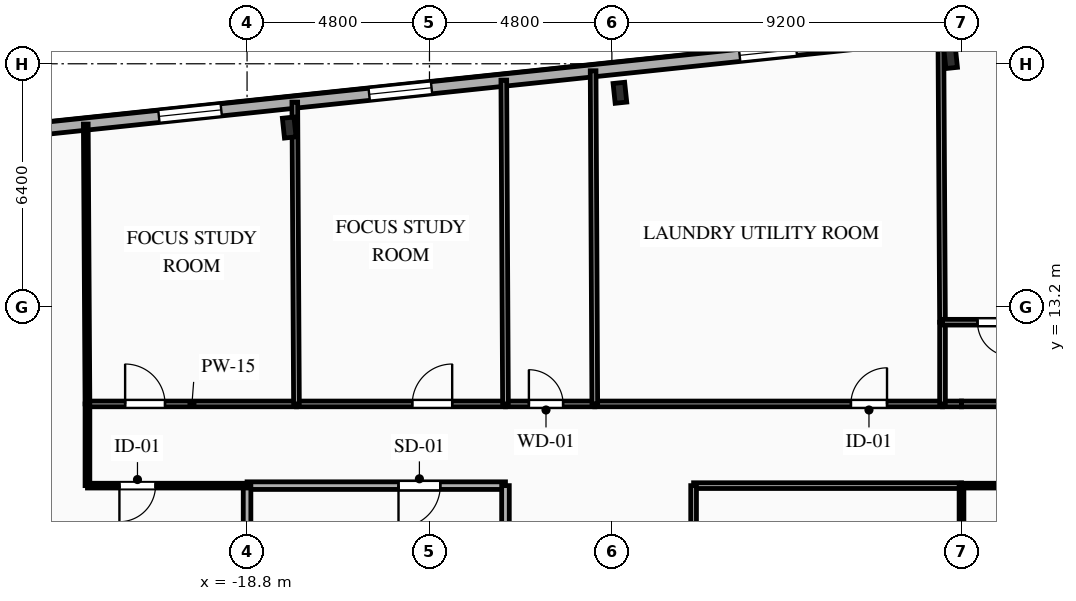
"""IFC4 building model, lengths in metres.
Left out: names, types, materials, properties, quantities, classifications, styles, units other than length and angle.
Written with IfcOpenShell. Run it as: python <this file> out.ifc"""

import sys

from ifc_helpers import new_model, si_unit, direction, frame, frame_2d, origin, origin_2d, place, context, subcontext, project, spatial, rectangle, i_section, extrude, element, fill, save


model = new_model("IFC4")
c1 = context("Model", 3, precision=1e-05, world=origin(), true_north=direction((0.0, 1.0)))
c2 = subcontext(c1, "Body", "Model", "MODEL_VIEW")
j1 = project(units=[si_unit("LENGTHUNIT", "METRE"), si_unit("PLANEANGLEUNIT", "RADIAN")], contexts=[c1])
p1 = place(None, origin())
s1 = spatial("IfcSite", under=j1, at=p1, CompositionType="ELEMENT")
p2 = place(p1, origin())
s2 = spatial("IfcBuilding", under=s1, at=p2, CompositionType="ELEMENT")
p3 = place(p2, frame((0.0, 0.0, 109.15)))
s3 = spatial("IfcBuildingStorey", under=s2, at=p3, CompositionType="ELEMENT", Elevation=109.15)
for number, where, z_axis, x_axis in (
    (1, (-0.287, 19.751, 0.0), (0.0, 0.0, 1.0), (0.995, 0.105, 0.0)),
    (2, (-8.989, 18.836, 0.0), (0.0, 0.0, 1.0), (0.995, 0.105, 0.0)),
    (3, (-17.691, 17.922, 0.0), (0.0, 0.0, 1.0), (0.995, 0.105, 0.0)),
):
    element("IfcColumn", number, at=place(p3, frame(where, z_axis=z_axis, x_axis=x_axis)), inside=s3, PredefinedType="COLUMN", context=c2, shape_type="SweptSolid", body=[
        extrude(i_section(OverallWidth=0.306, OverallDepth=0.524, WebThickness=0.021, FlangeThickness=0.04, FilletRadius=0.027, at=origin_2d()), origin(), (0.0, 0.0, 1.0), 3.35),
    ])
p4 = place(p3, frame((-27.107, 17.586, 0.0), z_axis=(0.0, 0.0, 1.0), x_axis=(0.994521628355, 0.104531003701, 0.0)))
e4 = element("IfcWall", 4, at=p4, inside=s3, PredefinedType="SOLIDWALL", context=c2, shape_type="SweptSolid", body=[
    extrude(rectangle(XDim=53.8, YDim=0.32, at=frame_2d((26.9, 0.0))), origin(), (0.0, 0.0, 1.0), 3.045),
])
p5 = place(p4, frame((1.532, 0.0, 0.85)))
e5 = element("IfcOpeningElement", 5, at=p5, cuts=e4, PredefinedType="OPENING", context=c2, shape_type="SweptSolid", body=[
    extrude(rectangle(XDim=1.5, YDim=1.85, at=frame_2d((0.75, 0.925))), frame((0.0, 0.17, 0.0), z_axis=(0.0, -1.0, 0.0), x_axis=(1.0, 0.0, 0.0)), (0.0, 0.0, 1.0), 0.34),
])
p6 = place(p4, frame((6.02, 0.0, 0.85)))
e6 = element("IfcOpeningElement", 6, at=p6, cuts=e4, PredefinedType="OPENING", context=c2, shape_type="SweptSolid", body=[
    extrude(rectangle(XDim=1.65, YDim=1.85, at=frame_2d((0.825, 0.925))), frame((0.0, 0.17, 0.0), z_axis=(0.0, -1.0, 0.0), x_axis=(1.0, 0.0, 0.0)), (0.0, 0.0, 1.0), 0.34),
])
p7 = place(p4, frame((11.584, 0.0, 0.85)))
e7 = element("IfcOpeningElement", 7, at=p7, cuts=e4, PredefinedType="OPENING", context=c2, shape_type="SweptSolid", body=[
    extrude(rectangle(XDim=1.65, YDim=1.85, at=frame_2d((0.825, 0.925))), frame((0.0, 0.17, 0.0), z_axis=(0.0, -1.0, 0.0), x_axis=(1.0, 0.0, 0.0)), (0.0, 0.0, 1.0), 0.34),
])
p8 = place(p4, frame((21.386, 0.0, 0.85)))
e8 = element("IfcOpeningElement", 8, at=p8, cuts=e4, PredefinedType="OPENING", context=c2, shape_type="SweptSolid", body=[
    extrude(rectangle(XDim=1.5, YDim=1.85, at=frame_2d((0.75, 0.925))), frame((0.0, 0.17, 0.0), z_axis=(0.0, -1.0, 0.0), x_axis=(1.0, 0.0, 0.0)), (0.0, 0.0, 1.0), 0.34),
])
p9 = place(p4, frame((31.404, 0.0, 0.85)))
e9 = element("IfcOpeningElement", 9, at=p9, cuts=e4, PredefinedType="OPENING", context=c2, shape_type="SweptSolid", body=[
    extrude(rectangle(XDim=2.2, YDim=1.85, at=frame_2d((1.1, 0.925))), frame((0.0, 0.17, 0.0), z_axis=(0.0, -1.0, 0.0), x_axis=(1.0, 0.0, 0.0)), (0.0, 0.0, 1.0), 0.34),
])
p10 = place(p4, frame((40.486, 0.0, 0.85)))
e10 = element("IfcOpeningElement", 10, at=p10, cuts=e4, PredefinedType="OPENING", context=c2, shape_type="SweptSolid", body=[
    extrude(rectangle(XDim=1.65, YDim=1.85, at=frame_2d((0.825, 0.925))), frame((0.0, 0.17, 0.0), z_axis=(0.0, -1.0, 0.0), x_axis=(1.0, 0.0, 0.0)), (0.0, 0.0, 1.0), 0.34),
])
p11 = place(p4, frame((46.53, 0.0, 0.85)))
e11 = element("IfcOpeningElement", 11, at=p11, cuts=e4, PredefinedType="OPENING", context=c2, shape_type="SweptSolid", body=[
    extrude(rectangle(XDim=1.65, YDim=1.85, at=frame_2d((0.825, 0.925))), frame((0.0, 0.17, 0.0), z_axis=(0.0, -1.0, 0.0), x_axis=(1.0, 0.0, 0.0)), (0.0, 0.0, 1.0), 0.34),
])
p12 = place(p4, frame((51.054, 0.0, 0.85)))
e12 = element("IfcOpeningElement", 12, at=p12, cuts=e4, PredefinedType="OPENING", context=c2, shape_type="SweptSolid", body=[
    extrude(rectangle(XDim=1.65, YDim=1.85, at=frame_2d((0.825, 0.925))), frame((0.0, 0.17, 0.0), z_axis=(0.0, -1.0, 0.0), x_axis=(1.0, 0.0, 0.0)), (0.0, 0.0, 1.0), 0.34),
])
p13 = place(p3, frame((-12.0, 8.5, 0.0), z_axis=(0.0, 0.0, 1.0), x_axis=(-1.0, 0.0, 0.0)))
e13 = element("IfcWall", 13, at=p13, inside=s3, PredefinedType="PARTITIONING", context=c2, shape_type="SweptSolid", body=[
    extrude(rectangle(XDim=6.8, YDim=0.2, at=frame_2d((3.4, 0.0))), origin(), (0.0, 0.0, 1.0), 3.045),
])
p14 = place(p13, frame((1.715, 0.0, 0.0)))
e14 = element("IfcOpeningElement", 14, at=p14, cuts=e13, PredefinedType="OPENING", context=c2, shape_type="SweptSolid", body=[
    extrude(rectangle(XDim=1.1, YDim=2.15, at=frame_2d((0.55, 1.075))), frame((0.0, 0.11, 0.0), z_axis=(0.0, -1.0, 0.0), x_axis=(1.0, 0.0, 0.0)), (0.0, 0.0, 1.0), 0.22),
])
p15 = place(p3, frame((-12.0, 5.6, 0.0), z_axis=(0.0, 0.0, 1.0), x_axis=(0.0, 1.0, 0.0)))
e15 = element("IfcWall", 15, at=p15, inside=s3, PredefinedType="PARTITIONING", context=c2, shape_type="SweptSolid", body=[
    extrude(rectangle(XDim=2.9, YDim=0.2, at=frame_2d((1.45, 0.0))), origin(), (0.0, 0.0, 1.0), 3.045),
])
p16 = place(p3, frame((-18.8, 8.5, 0.0), z_axis=(0.0, 0.0, 1.0), x_axis=(0.0, -1.0, 0.0)))
e16 = element("IfcWall", 16, at=p16, inside=s3, PredefinedType="PARTITIONING", context=c2, shape_type="SweptSolid", body=[
    extrude(rectangle(XDim=2.9, YDim=0.2, at=frame_2d((1.45, 0.0))), origin(), (0.0, 0.0, 1.0), 2.53),
])
p17 = place(p3, frame((-18.8, 8.5, 0.0), z_axis=(0.0, 0.0, 1.0), x_axis=(-1.0, 0.0, 0.0)))
e17 = element("IfcWall", 17, at=p17, inside=s3, PredefinedType="PARTITIONING", context=c2, shape_type="SweptSolid", body=[
    extrude(rectangle(XDim=4.2, YDim=0.125, at=frame_2d((2.1, 0.0))), origin(), (0.0, 0.0, 1.0), 3.045),
])
p18 = place(p17, frame((2.409, 0.0, 0.0)))
e18 = element("IfcOpeningElement", 18, at=p18, cuts=e17, PredefinedType="OPENING", context=c2, shape_type="SweptSolid", body=[
    extrude(rectangle(XDim=0.95, YDim=2.1, at=frame_2d((0.475, 1.05))), frame((0.0, 0.073, 0.0), z_axis=(0.0, -1.0, 0.0), x_axis=(1.0, 0.0, 0.0)), (0.0, 0.0, 1.0), 0.145),
])
p19 = place(p3, frame((-23.0, 8.5, 0.0), z_axis=(0.0, 0.0, 1.0), x_axis=(0.0, 1.0, 0.0)))
e19 = element("IfcWall", 19, at=p19, inside=s3, PredefinedType="PARTITIONING", context=c2, shape_type="SweptSolid", body=[
    extrude(rectangle(XDim=2.15, YDim=0.125, at=frame_2d((1.075, 0.0))), origin(), (0.0, 0.0, 1.0), 3.045),
])
p20 = place(p3, frame((-23.0, 10.65, 0.0), z_axis=(0.0, 0.0, 1.0), x_axis=(1.0, 0.0, 0.0)))
e20 = element("IfcWall", 20, at=p20, inside=s3, PredefinedType="PARTITIONING", context=c2, shape_type="SweptSolid", body=[
    extrude(rectangle(XDim=5.5, YDim=0.15, at=frame_2d((2.75, 0.0))), origin(), (0.0, 0.0, 1.0), 3.045),
])
p21 = place(p20, frame((0.991, 0.0, 0.0)))
e21 = element("IfcOpeningElement", 21, at=p21, cuts=e20, PredefinedType="OPENING", context=c2, shape_type="SweptSolid", body=[
    extrude(rectangle(XDim=1.05, YDim=2.15, at=frame_2d((0.525, 1.075))), frame((0.0, 0.085, 0.0), z_axis=(0.0, -1.0, 0.0), x_axis=(1.0, 0.0, 0.0)), (0.0, 0.0, 1.0), 0.17),
])
p22 = place(p3, frame((-17.5, 10.65, 0.0), z_axis=(0.0, 0.0, 1.0), x_axis=(1.0, 0.0, 0.0)))
e22 = element("IfcWall", 22, at=p22, inside=s3, PredefinedType="PARTITIONING", context=c2, shape_type="SweptSolid", body=[
    extrude(rectangle(XDim=5.5, YDim=0.15, at=frame_2d((2.75, 0.0))), origin(), (0.0, 0.0, 1.0), 3.045),
])
p23 = place(p22, frame((3.048, 0.0, 0.0)))
e23 = element("IfcOpeningElement", 23, at=p23, cuts=e22, PredefinedType="OPENING", context=c2, shape_type="SweptSolid", body=[
    extrude(rectangle(XDim=1.05, YDim=2.15, at=frame_2d((0.525, 1.075))), frame((0.0, 0.085, 0.0), z_axis=(0.0, -1.0, 0.0), x_axis=(1.0, 0.0, 0.0)), (0.0, 0.0, 1.0), 0.17),
])
p24 = place(p3, frame((-12.0, 10.65, 0.0), z_axis=(0.0, 0.0, 1.0), x_axis=(1.0, 0.0, 0.0)))
e24 = element("IfcWall", 24, at=p24, inside=s3, PredefinedType="PLUMBINGWALL", context=c2, shape_type="SweptSolid", body=[
    extrude(rectangle(XDim=2.35, YDim=0.15, at=frame_2d((1.175, 0.0))), origin(), (0.0, 0.0, 1.0), 3.045),
])
p25 = place(p24, frame((0.616, 0.0, 0.0)))
e25 = element("IfcOpeningElement", 25, at=p25, cuts=e24, PredefinedType="OPENING", context=c2, shape_type="SweptSolid", body=[
    extrude(rectangle(XDim=0.9, YDim=2.1, at=frame_2d((0.45, 1.05))), frame((0.0, 0.085, 0.0), z_axis=(0.0, -1.0, 0.0), x_axis=(1.0, 0.0, 0.0)), (0.0, 0.0, 1.0), 0.17),
])
p26 = place(p3, frame((-9.65, 10.65, 0.0), z_axis=(0.0, 0.0, 1.0), x_axis=(1.0, 0.0, 0.0)))
e26 = element("IfcWall", 26, at=p26, inside=s3, PredefinedType="PARTITIONING", context=c2, shape_type="SweptSolid", body=[
    extrude(rectangle(XDim=9.15, YDim=0.15, at=frame_2d((4.575, 0.0))), origin(), (0.0, 0.0, 1.0), 3.045),
])
p27 = place(p26, frame((6.74, 0.0, 0.0)))
e27 = element("IfcOpeningElement", 27, at=p27, cuts=e26, PredefinedType="OPENING", context=c2, shape_type="SweptSolid", body=[
    extrude(rectangle(XDim=0.95, YDim=2.1, at=frame_2d((0.475, 1.05))), frame((0.0, 0.085, 0.0), z_axis=(0.0, -1.0, 0.0), x_axis=(1.0, 0.0, 0.0)), (0.0, 0.0, 1.0), 0.17),
])
p28 = place(p3, frame((-0.5, 10.65, 0.0), z_axis=(0.0, 0.0, 1.0), x_axis=(1.0, 0.0, 0.0)))
e28 = element("IfcWall", 28, at=p28, inside=s3, PredefinedType="PLUMBINGWALL", context=c2, shape_type="SweptSolid", body=[
    extrude(rectangle(XDim=0.5, YDim=0.15, at=frame_2d((0.25, 0.0))), origin(), (0.0, 0.0, 1.0), 3.045),
])
p29 = place(p3, frame((0.0, 8.5, 0.0), z_axis=(0.0, 0.0, 1.0), x_axis=(-1.0, 0.0, 0.0)))
e29 = element("IfcWall", 29, at=p29, inside=s3, PredefinedType="PARTITIONING", context=c2, shape_type="SweptSolid", body=[
    extrude(rectangle(XDim=7.05, YDim=0.15, at=frame_2d((3.525, 0.0))), origin(), (0.0, 0.0, 1.0), 3.045),
])
p30 = place(p3, frame((0.0, 10.65, 0.0), z_axis=(0.0, 0.0, 1.0), x_axis=(1.0, 0.0, 0.0)))
e30 = element("IfcWall", 30, at=p30, inside=s3, PredefinedType="PLUMBINGWALL", context=c2, shape_type="SweptSolid", body=[
    extrude(rectangle(XDim=1.95, YDim=0.15, at=frame_2d((0.975, 0.0))), origin(), (0.0, 0.0, 1.0), 3.045),
])
p31 = place(p3, frame((7.05, 8.5, 0.0), z_axis=(0.0, 0.0, 1.0), x_axis=(-1.0, 0.0, 0.0)))
e31 = element("IfcWall", 31, at=p31, inside=s3, PredefinedType="PARTITIONING", context=c2, shape_type="SweptSolid", body=[
    extrude(rectangle(XDim=7.05, YDim=0.125, at=frame_2d((3.525, 0.0))), origin(), (0.0, 0.0, 1.0), 3.045),
])
p32 = place(p3, frame((-7.05, 8.5, 0.0), z_axis=(0.0, 0.0, 1.0), x_axis=(0.0, -1.0, 0.0)))
e32 = element("IfcWall", 32, at=p32, inside=s3, PredefinedType="PARTITIONING", context=c2, shape_type="SweptSolid", body=[
    extrude(rectangle(XDim=14.1, YDim=0.15, at=frame_2d((7.05, 0.0))), origin(), (0.0, 0.0, 1.0), 3.045),
])
p33 = place(p32, frame((8.074, 0.0, 0.0)))
e33 = element("IfcOpeningElement", 33, at=p33, cuts=e32, PredefinedType="OPENING", context=c2, shape_type="SweptSolid", body=[
    extrude(rectangle(XDim=0.95, YDim=2.1, at=frame_2d((0.475, 1.05))), frame((0.0, 0.085, 0.0), z_axis=(0.0, -1.0, 0.0), x_axis=(1.0, 0.0, 0.0)), (0.0, 0.0, 1.0), 0.17),
])
p34 = place(p3, frame((-23.044, 18.013, 0.0), z_axis=(0.0, 0.0, 1.0), x_axis=(0.005968459246, -0.999982188588, 0.0)))
e34 = element("IfcWall", 34, at=p34, inside=s3, PredefinedType="PARTITIONING", context=c2, shape_type="SweptSolid", body=[
    extrude(rectangle(XDim=7.363, YDim=0.125, at=frame_2d((3.682, 0.0))), origin(), (0.0, 0.0, 1.0), 3.045),
])
p35 = place(p3, frame((-17.544, 18.591, 0.0), z_axis=(0.0, 0.0, 1.0), x_axis=(0.005533949572, -0.999984687584, 0.0)))
e35 = element("IfcWall", 35, at=p35, inside=s3, PredefinedType="PARTITIONING", context=c2, shape_type="SweptSolid", body=[
    extrude(rectangle(XDim=7.941, YDim=0.15, at=frame_2d((3.97, 0.0))), origin(), (0.0, 0.0, 1.0), 2.53),
])
p36 = place(p3, frame((-12.044, 19.169, 0.0), z_axis=(0.0, 0.0, 1.0), x_axis=(0.005158411336, -0.999986695308, 0.0)))
e36 = element("IfcWall", 36, at=p36, inside=s3, PredefinedType="PLUMBINGWALL", context=c2, shape_type="SweptSolid", body=[
    extrude(rectangle(XDim=8.519, YDim=0.15, at=frame_2d((4.26, 0.0))), origin(), (0.0, 0.0, 1.0), 3.045),
])
p37 = place(p3, frame((-9.694, 19.416, 0.0), z_axis=(0.0, 0.0, 1.0), x_axis=(0.005013026743, -0.999987434702, 0.0)))
e37 = element("IfcWall", 37, at=p37, inside=s3, PredefinedType="PLUMBINGWALL", context=c2, shape_type="SweptSolid", body=[
    extrude(rectangle(XDim=8.766, YDim=0.15, at=frame_2d((4.383, 0.0))), origin(), (0.0, 0.0, 1.0), 3.045),
])
p38 = place(p3, frame((-0.544, 20.378, 0.0), z_axis=(0.0, 0.0, 1.0), x_axis=(0.005799245221, -0.999983184236, 0.0)))
e38 = element("IfcWall", 38, at=p38, inside=s3, PredefinedType="PARTITIONING", context=c2, shape_type="SweptSolid", body=[
    extrude(rectangle(XDim=7.578, YDim=0.15, at=frame_2d((3.789, 0.0))), origin(), (0.0, 0.0, 1.0), 3.045),
])
p39 = place(p3, frame((-0.5, 12.8, 0.0), z_axis=(0.0, 0.0, 1.0), x_axis=(0.0, -1.0, 0.0)))
e39 = element("IfcWall", 39, at=p39, inside=s3, PredefinedType="PLUMBINGWALL", context=c2, shape_type="SweptSolid", body=[
    extrude(rectangle(XDim=2.15, YDim=0.15, at=frame_2d((1.075, 0.0))), origin(), (0.0, 0.0, 1.0), 3.045),
])
p40 = place(p3, frame((1.95, 12.8, 0.0), z_axis=(0.0, 0.0, 1.0), x_axis=(-1.0, 0.0, 0.0)))
e40 = element("IfcWall", 40, at=p40, inside=s3, PredefinedType="PLUMBINGWALL", context=c2, shape_type="SweptSolid", body=[
    extrude(rectangle(XDim=2.45, YDim=0.15, at=frame_2d((1.225, 0.0))), origin(), (0.0, 0.0, 1.0), 3.045),
])
p41 = place(p40, frame((0.629, 0.0, 0.0)))
e41 = element("IfcOpeningElement", 41, at=p41, cuts=e40, PredefinedType="OPENING", context=c2, shape_type="SweptSolid", body=[
    extrude(rectangle(XDim=0.9, YDim=2.1, at=frame_2d((0.45, 1.05))), frame((0.0, 0.085, 0.0), z_axis=(0.0, -1.0, 0.0), x_axis=(1.0, 0.0, 0.0)), (0.0, 0.0, 1.0), 0.17),
])
p42 = place(p3, frame((0.0, 8.5, 0.0), z_axis=(0.0, 0.0, 1.0), x_axis=(0.0, -1.0, 0.0)))
e42 = element("IfcWall", 42, at=p42, inside=s3, PredefinedType="PARTITIONING", context=c2, shape_type="SweptSolid", body=[
    extrude(rectangle(XDim=14.1, YDim=0.125, at=frame_2d((7.05, 0.0))), origin(), (0.0, 0.0, 1.0), 3.045),
])
p43 = place(p6, origin())
e43 = element("IfcWindow", 43, at=p43, inside=s3, PartitioningType="SINGLE_PANEL", PredefinedType="WINDOW", context=c2, shape_type="SweptSolid", body=[
    extrude(rectangle(XDim=1.65, YDim=1.85, at=frame_2d((0.825, 0.925))), frame((0.0, 0.03, 0.0), z_axis=(0.0, -1.0, 0.0), x_axis=(1.0, 0.0, 0.0)), (0.0, 0.0, 1.0), 0.06),
])
fill(e6, e43)
p44 = place(p7, origin())
e44 = element("IfcWindow", 44, at=p44, inside=s3, PartitioningType="SINGLE_PANEL", PredefinedType="WINDOW", context=c2, shape_type="SweptSolid", body=[
    extrude(rectangle(XDim=1.65, YDim=1.85, at=frame_2d((0.825, 0.925))), frame((0.0, 0.03, 0.0), z_axis=(0.0, -1.0, 0.0), x_axis=(1.0, 0.0, 0.0)), (0.0, 0.0, 1.0), 0.06),
])
fill(e7, e44)
p45 = place(p8, origin())
e45 = element("IfcWindow", 45, at=p45, inside=s3, PartitioningType="SINGLE_PANEL", PredefinedType="WINDOW", context=c2, shape_type="SweptSolid", body=[
    extrude(rectangle(XDim=1.5, YDim=1.85, at=frame_2d((0.75, 0.925))), frame((0.0, 0.03, 0.0), z_axis=(0.0, -1.0, 0.0), x_axis=(1.0, 0.0, 0.0)), (0.0, 0.0, 1.0), 0.06),
])
fill(e8, e45)
p46 = place(p14, origin())
e46 = element("IfcDoor", 46, at=p46, inside=s3, OperationType="SINGLE_SWING_RIGHT", PredefinedType="DOOR", context=c2, shape_type="SweptSolid", body=[
    extrude(rectangle(XDim=1.1, YDim=2.15, at=frame_2d((0.55, 1.075))), frame((0.0, 0.025, 0.0), z_axis=(0.0, -1.0, 0.0), x_axis=(1.0, 0.0, 0.0)), (0.0, 0.0, 1.0), 0.05),
])
fill(e14, e46)
p47 = place(p18, origin())
e47 = element("IfcDoor", 47, at=p47, inside=s3, OperationType="SINGLE_SWING_RIGHT", PredefinedType="DOOR", context=c2, shape_type="SweptSolid", body=[
    extrude(rectangle(XDim=0.95, YDim=2.1, at=frame_2d((0.475, 1.05))), frame((0.0, 0.025, 0.0), z_axis=(0.0, -1.0, 0.0), x_axis=(1.0, 0.0, 0.0)), (0.0, 0.0, 1.0), 0.05),
])
fill(e18, e47)
p48 = place(p21, origin())
e48 = element("IfcDoor", 48, at=p48, inside=s3, OperationType="SINGLE_SWING_LEFT", PredefinedType="DOOR", context=c2, shape_type="SweptSolid", body=[
    extrude(rectangle(XDim=1.05, YDim=2.15, at=frame_2d((0.525, 1.075))), frame((0.0, 0.025, 0.0), z_axis=(0.0, -1.0, 0.0), x_axis=(1.0, 0.0, 0.0)), (0.0, 0.0, 1.0), 0.05),
])
fill(e21, e48)
p49 = place(p23, origin())
e49 = element("IfcDoor", 49, at=p49, inside=s3, OperationType="SINGLE_SWING_RIGHT", PredefinedType="DOOR", context=c2, shape_type="SweptSolid", body=[
    extrude(rectangle(XDim=1.05, YDim=2.15, at=frame_2d((0.525, 1.075))), frame((0.0, 0.025, 0.0), z_axis=(0.0, -1.0, 0.0), x_axis=(1.0, 0.0, 0.0)), (0.0, 0.0, 1.0), 0.05),
])
fill(e23, e49)
p50 = place(p25, origin())
e50 = element("IfcDoor", 50, at=p50, inside=s3, OperationType="SINGLE_SWING_LEFT", PredefinedType="DOOR", context=c2, shape_type="SweptSolid", body=[
    extrude(rectangle(XDim=0.9, YDim=2.1, at=frame_2d((0.45, 1.05))), frame((0.0, 0.025, 0.0), z_axis=(0.0, -1.0, 0.0), x_axis=(1.0, 0.0, 0.0)), (0.0, 0.0, 1.0), 0.05),
])
fill(e25, e50)
p51 = place(p27, origin())
e51 = element("IfcDoor", 51, at=p51, inside=s3, OperationType="SINGLE_SWING_RIGHT", PredefinedType="DOOR", context=c2, shape_type="SweptSolid", body=[
    extrude(rectangle(XDim=0.95, YDim=2.1, at=frame_2d((0.475, 1.05))), frame((0.0, 0.025, 0.0), z_axis=(0.0, -1.0, 0.0), x_axis=(1.0, 0.0, 0.0)), (0.0, 0.0, 1.0), 0.05),
])
fill(e27, e51)
p52 = place(p41, origin())
e52 = element("IfcDoor", 52, at=p52, inside=s3, OperationType="SINGLE_SWING_LEFT", PredefinedType="DOOR", context=c2, shape_type="SweptSolid", body=[
    extrude(rectangle(XDim=0.9, YDim=2.1, at=frame_2d((0.45, 1.05))), frame((0.0, 0.025, 0.0), z_axis=(0.0, -1.0, 0.0), x_axis=(1.0, 0.0, 0.0)), (0.0, 0.0, 1.0), 0.05),
])
fill(e41, e52)
save(model, sys.argv[1])
